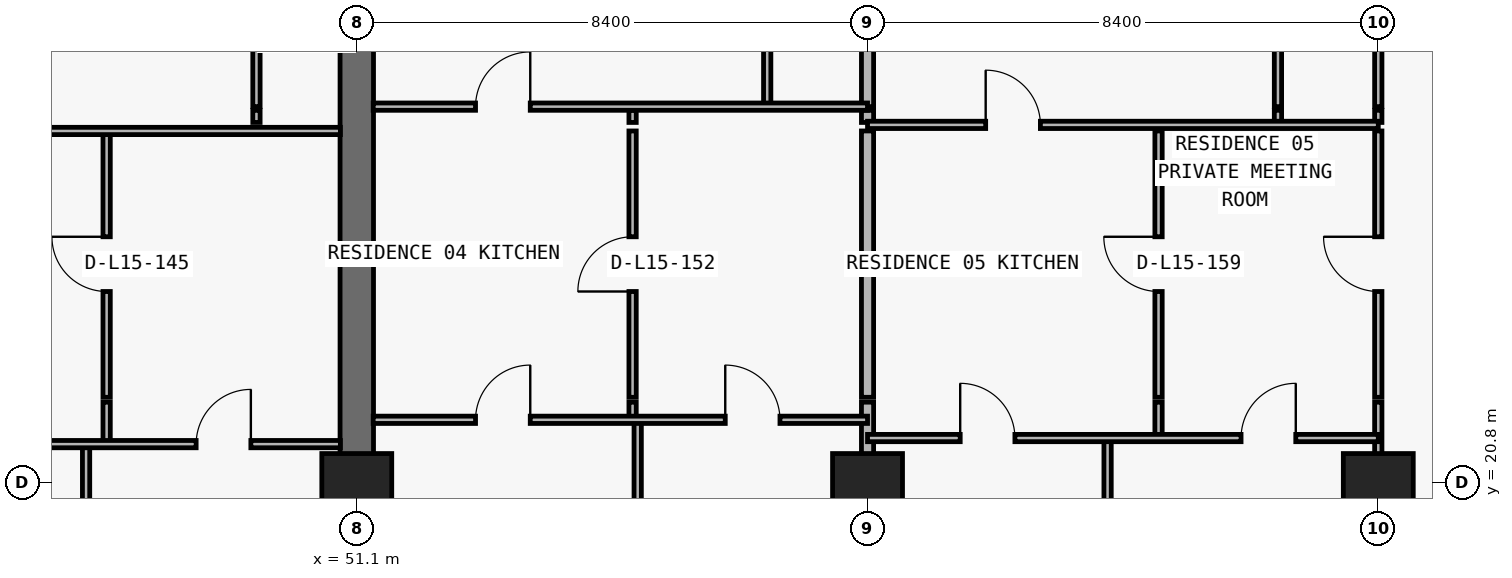
"""IFC4 building model, lengths in metres.
Left out: names, types, materials, properties, quantities, classifications, styles, units other than length and angle.
Written with IfcOpenShell. Run it as: python <this file> out.ifc"""

import sys

from ifc_helpers import new_model, si_unit, direction, frame, frame_2d, origin, origin_2d, place, context, subcontext, project, spatial, rectangle, extrude, element, fill, save


model = new_model("IFC4")
c1 = context("Model", 3, precision=1e-05, world=origin(), true_north=direction((0.0, 1.0)))
c2 = subcontext(c1, "Body", "Model", "MODEL_VIEW")
j1 = project(units=[si_unit("LENGTHUNIT", "METRE"), si_unit("PLANEANGLEUNIT", "RADIAN")], contexts=[c1])
p1 = place(None, origin())
s1 = spatial("IfcSite", under=j1, at=p1, CompositionType="ELEMENT")
p2 = place(p1, origin())
s2 = spatial("IfcBuilding", under=s1, at=p2, CompositionType="ELEMENT")
p3 = place(p2, frame((0.0, 0.0, 59.7)))
s3 = spatial("IfcBuildingStorey", under=s2, at=p3, CompositionType="ELEMENT", Elevation=59.7)
for number, where, z_axis, x_axis in (
    (1, (51.1, 20.8, 0.0), (0.0, 0.0, 1.0), (1.0, 0.0, 0.0)),
    (2, (59.5, 20.8, 0.0), (0.0, 0.0, 1.0), (1.0, 0.0, 0.0)),
    (3, (67.9, 20.8, 0.0), (0.0, 0.0, 1.0), (1.0, 0.0, 0.0)),
):
    element("IfcColumn", number, at=place(p3, frame(where, z_axis=z_axis, x_axis=x_axis)), inside=s3, PredefinedType="COLUMN", context=c2, shape_type="SweptSolid", body=[
        extrude(rectangle(XDim=1.15, YDim=0.95, at=origin_2d()), origin(), (0.0, 0.0, 1.0), 3.05),
    ])
p4 = place(p3, frame((51.1, 20.8, 0.0), z_axis=(0.0, 0.0, 1.0), x_axis=(0.0, 1.0, 0.0)))
e4 = element("IfcWall", 4, at=p4, inside=s3, PredefinedType="SHEAR", context=c2, shape_type="SweptSolid", body=[
    extrude(rectangle(XDim=8.6, YDim=0.55, at=frame_2d((4.3, 0.0))), origin(), (0.0, 0.0, 1.0), 3.05),
])
p5 = place(p3, frame((46.648, 6.24, 0.0), z_axis=(0.0, 0.0, 1.0), x_axis=(0.0, 1.0, 0.0)))
e5 = element("IfcWall", 5, at=p5, inside=s3, PredefinedType="PARTITIONING", context=c2, shape_type="SweptSolid", body=[
    extrude(rectangle(XDim=15.19, YDim=0.12, at=frame_2d((7.595, 0.0))), origin(), (0.0, 0.0, 1.0), 3.05),
])
p6 = place(p3, frame((46.986, 21.43, 0.0), z_axis=(0.0, 0.0, 1.0), x_axis=(0.0, 1.0, 0.0)))
e6 = element("IfcWall", 6, at=p6, inside=s3, PredefinedType="PARTITIONING", context=c2, shape_type="SweptSolid", body=[
    extrude(rectangle(XDim=0.69, YDim=0.12, at=frame_2d((0.345, 0.0))), origin(), (0.0, 0.0, 1.0), 3.05),
])
p7 = place(p3, frame((46.986, 22.2, 0.0), z_axis=(0.0, 0.0, 1.0), x_axis=(0.0, 1.0, 0.0)))
e7 = element("IfcWall", 7, at=p7, inside=s3, PredefinedType="PARTITIONING", context=c2, shape_type="SweptSolid", body=[
    extrude(rectangle(XDim=4.38, YDim=0.12, at=frame_2d((2.19, 0.0))), origin(), (0.0, 0.0, 1.0), 3.05),
])
p8 = place(p7, frame((1.74, 0.0, 0.0)))
e8 = element("IfcOpeningElement", 8, at=p8, cuts=e7, PredefinedType="OPENING", context=c2, shape_type="SweptSolid", body=[
    extrude(rectangle(XDim=0.9, YDim=2.15, at=frame_2d((0.45, 1.075))), frame((0.0, 0.07, 0.0), z_axis=(0.0, -1.0, 0.0), x_axis=(1.0, 0.0, 0.0)), (0.0, 0.0, 1.0), 0.14),
])
p9 = place(p3, frame((49.45, 26.72, 0.0), z_axis=(0.0, 0.0, 1.0), x_axis=(0.0, 1.0, 0.0)))
e9 = element("IfcWall", 9, at=p9, inside=s3, PredefinedType="PARTITIONING", context=c2, shape_type="SweptSolid", body=[
    extrude(rectangle(XDim=0.2, YDim=0.12, at=frame_2d((0.1, 0.0))), origin(), (0.0, 0.0, 1.0), 3.05),
])
p10 = place(p3, frame((49.45, 26.98, 0.0), z_axis=(0.0, 0.0, 1.0), x_axis=(0.0, 1.0, 0.0)))
e10 = element("IfcWall", 10, at=p10, inside=s3, PredefinedType="PARTITIONING", context=c2, shape_type="SweptSolid", body=[
    extrude(rectangle(XDim=6.82, YDim=0.12, at=frame_2d((3.41, 0.0))), origin(), (0.0, 0.0, 1.0), 3.05),
])
p11 = place(p10, frame((3.435, 0.0, 0.0)))
e11 = element("IfcOpeningElement", 11, at=p11, cuts=e10, PredefinedType="OPENING", context=c2, shape_type="SweptSolid", body=[
    extrude(rectangle(XDim=0.85, YDim=2.1, at=frame_2d((0.425, 1.05))), frame((0.0, 0.07, 0.0), z_axis=(0.0, -1.0, 0.0), x_axis=(1.0, 0.0, 0.0)), (0.0, 0.0, 1.0), 0.14),
])
p12 = place(p3, frame((51.1, 6.24, 0.0), z_axis=(0.0, 0.0, 1.0), x_axis=(0.0, 1.0, 0.0)))
e12 = element("IfcWall", 12, at=p12, inside=s3, PredefinedType="PARTITIONING", context=c2, shape_type="SweptSolid", body=[
    extrude(rectangle(XDim=14.555, YDim=0.2, at=frame_2d((7.277, 0.0))), origin(), (0.0, 0.0, 1.0), 2.11),
])
p13 = place(p3, frame((55.636, 21.83, 0.0), z_axis=(0.0, 0.0, 1.0), x_axis=(0.0, 1.0, 0.0)))
e13 = element("IfcWall", 13, at=p13, inside=s3, PredefinedType="PARTITIONING", context=c2, shape_type="SweptSolid", body=[
    extrude(rectangle(XDim=0.29, YDim=0.12, at=frame_2d((0.145, 0.0))), origin(), (0.0, 0.0, 1.0), 3.05),
])
p14 = place(p3, frame((55.636, 22.2, 0.0), z_axis=(0.0, 0.0, 1.0), x_axis=(0.0, 1.0, 0.0)))
e14 = element("IfcWall", 14, at=p14, inside=s3, PredefinedType="PARTITIONING", context=c2, shape_type="SweptSolid", body=[
    extrude(rectangle(XDim=4.38, YDim=0.12, at=frame_2d((2.19, 0.0))), origin(), (0.0, 0.0, 1.0), 3.05),
])
p15 = place(p14, frame((1.74, 0.0, 0.0)))
e15 = element("IfcOpeningElement", 15, at=p15, cuts=e14, PredefinedType="OPENING", context=c2, shape_type="SweptSolid", body=[
    extrude(rectangle(XDim=0.9, YDim=2.15, at=frame_2d((0.45, 1.075))), frame((0.0, 0.07, 0.0), z_axis=(0.0, -1.0, 0.0), x_axis=(1.0, 0.0, 0.0)), (0.0, 0.0, 1.0), 0.14),
])
p16 = place(p3, frame((55.636, 26.72, 0.0), z_axis=(0.0, 0.0, 1.0), x_axis=(0.0, 1.0, 0.0)))
e16 = element("IfcWall", 16, at=p16, inside=s3, PredefinedType="PARTITIONING", context=c2, shape_type="SweptSolid", body=[
    extrude(rectangle(XDim=0.2, YDim=0.12, at=frame_2d((0.1, 0.0))), origin(), (0.0, 0.0, 1.0), 3.05),
])
p17 = place(p3, frame((55.72, 6.24, 0.0), z_axis=(0.0, 0.0, 1.0), x_axis=(0.0, 1.0, 0.0)))
e17 = element("IfcWall", 17, at=p17, inside=s3, PredefinedType="PARTITIONING", context=c2, shape_type="SweptSolid", body=[
    extrude(rectangle(XDim=15.585, YDim=0.12, at=frame_2d((7.792, 0.0))), origin(), (0.0, 0.0, 1.0), 3.05),
])
p18 = place(p3, frame((57.85, 26.98, 0.0), z_axis=(0.0, 0.0, 1.0), x_axis=(0.0, 1.0, 0.0)))
e18 = element("IfcWall", 18, at=p18, inside=s3, PredefinedType="PARTITIONING", context=c2, shape_type="SweptSolid", body=[
    extrude(rectangle(XDim=6.82, YDim=0.12, at=frame_2d((3.41, 0.0))), origin(), (0.0, 0.0, 1.0), 3.05),
])
p19 = place(p18, frame((3.435, 0.0, 0.0)))
e19 = element("IfcOpeningElement", 19, at=p19, cuts=e18, PredefinedType="OPENING", context=c2, shape_type="SweptSolid", body=[
    extrude(rectangle(XDim=0.85, YDim=2.1, at=frame_2d((0.425, 1.05))), frame((0.0, 0.07, 0.0), z_axis=(0.0, -1.0, 0.0), x_axis=(1.0, 0.0, 0.0)), (0.0, 0.0, 1.0), 0.14),
])
p20 = place(p3, frame((59.5, 6.24, 0.0), z_axis=(0.0, 0.0, 1.0), x_axis=(0.0, 1.0, 0.0)))
e20 = element("IfcWall", 20, at=p20, inside=s3, PredefinedType="PARTITIONING", context=c2, shape_type="SweptSolid", body=[
    extrude(rectangle(XDim=15.88, YDim=0.2, at=frame_2d((7.94, 0.0))), origin(), (0.0, 0.0, 1.0), 2.11),
])
p21 = place(p3, frame((59.5, 22.2, 0.0), z_axis=(0.0, 0.0, 1.0), x_axis=(0.0, 1.0, 0.0)))
e21 = element("IfcWall", 21, at=p21, inside=s3, PredefinedType="PARTITIONING", context=c2, shape_type="SweptSolid", body=[
    extrude(rectangle(XDim=4.38, YDim=0.2, at=frame_2d((2.19, 0.0))), origin(), (0.0, 0.0, 1.0), 2.11),
])
p22 = place(p3, frame((59.5, 26.72, 0.0), z_axis=(0.0, 0.0, 1.0), x_axis=(0.0, 1.0, 0.0)))
e22 = element("IfcWall", 22, at=p22, inside=s3, PredefinedType="PARTITIONING", context=c2, shape_type="SweptSolid", body=[
    extrude(rectangle(XDim=0.2, YDim=0.2, at=frame_2d((0.1, 0.0))), origin(), (0.0, 0.0, 1.0), 2.11),
])
p23 = place(p3, frame((59.5, 26.98, 0.0), z_axis=(0.0, 0.0, 1.0), x_axis=(0.0, 1.0, 0.0)))
e23 = element("IfcWall", 23, at=p23, inside=s3, PredefinedType="PARTITIONING", context=c2, shape_type="SweptSolid", body=[
    extrude(rectangle(XDim=6.82, YDim=0.2, at=frame_2d((3.41, 0.0))), origin(), (0.0, 0.0, 1.0), 2.11),
])
p24 = place(p3, frame((63.448, 6.24, 0.0), z_axis=(0.0, 0.0, 1.0), x_axis=(0.0, 1.0, 0.0)))
e24 = element("IfcWall", 24, at=p24, inside=s3, PredefinedType="PARTITIONING", context=c2, shape_type="SweptSolid", body=[
    extrude(rectangle(XDim=15.29, YDim=0.12, at=frame_2d((7.645, 0.0))), origin(), (0.0, 0.0, 1.0), 3.05),
])
p25 = place(p3, frame((64.286, 21.53, 0.0), z_axis=(0.0, 0.0, 1.0), x_axis=(0.0, 1.0, 0.0)))
e25 = element("IfcWall", 25, at=p25, inside=s3, PredefinedType="PARTITIONING", context=c2, shape_type="SweptSolid", body=[
    extrude(rectangle(XDim=0.59, YDim=0.12, at=frame_2d((0.295, 0.0))), origin(), (0.0, 0.0, 1.0), 3.05),
])
p26 = place(p3, frame((64.286, 22.2, 0.0), z_axis=(0.0, 0.0, 1.0), x_axis=(0.0, 1.0, 0.0)))
e26 = element("IfcWall", 26, at=p26, inside=s3, PredefinedType="PARTITIONING", context=c2, shape_type="SweptSolid", body=[
    extrude(rectangle(XDim=4.38, YDim=0.12, at=frame_2d((2.19, 0.0))), origin(), (0.0, 0.0, 1.0), 3.05),
])
p27 = place(p26, frame((1.74, 0.0, 0.0)))
e27 = element("IfcOpeningElement", 27, at=p27, cuts=e26, PredefinedType="OPENING", context=c2, shape_type="SweptSolid", body=[
    extrude(rectangle(XDim=0.9, YDim=2.15, at=frame_2d((0.45, 1.075))), frame((0.0, 0.07, 0.0), z_axis=(0.0, -1.0, 0.0), x_axis=(1.0, 0.0, 0.0)), (0.0, 0.0, 1.0), 0.14),
])
p28 = place(p3, frame((66.25, 26.72, 0.0), z_axis=(0.0, 0.0, 1.0), x_axis=(0.0, 1.0, 0.0)))
e28 = element("IfcWall", 28, at=p28, inside=s3, PredefinedType="PARTITIONING", context=c2, shape_type="SweptSolid", body=[
    extrude(rectangle(XDim=0.2, YDim=0.12, at=frame_2d((0.1, 0.0))), origin(), (0.0, 0.0, 1.0), 3.05),
])
p29 = place(p3, frame((66.25, 26.98, 0.0), z_axis=(0.0, 0.0, 1.0), x_axis=(0.0, 1.0, 0.0)))
e29 = element("IfcWall", 29, at=p29, inside=s3, PredefinedType="PARTITIONING", context=c2, shape_type="SweptSolid", body=[
    extrude(rectangle(XDim=6.82, YDim=0.12, at=frame_2d((3.41, 0.0))), origin(), (0.0, 0.0, 1.0), 3.05),
])
p30 = place(p29, frame((3.435, 0.0, 0.0)))
e30 = element("IfcOpeningElement", 30, at=p30, cuts=e29, PredefinedType="OPENING", context=c2, shape_type="SweptSolid", body=[
    extrude(rectangle(XDim=0.85, YDim=2.1, at=frame_2d((0.425, 1.05))), frame((0.0, 0.07, 0.0), z_axis=(0.0, -1.0, 0.0), x_axis=(1.0, 0.0, 0.0)), (0.0, 0.0, 1.0), 0.14),
])
p31 = place(p3, frame((67.9, 6.24, 0.0), z_axis=(0.0, 0.0, 1.0), x_axis=(0.0, 1.0, 0.0)))
e31 = element("IfcWall", 31, at=p31, inside=s3, PredefinedType="PARTITIONING", context=c2, shape_type="SweptSolid", body=[
    extrude(rectangle(XDim=15.88, YDim=0.12, at=frame_2d((7.94, 0.0))), origin(), (0.0, 0.0, 1.0), 2.11),
])
p32 = place(p3, frame((67.9, 22.2, 0.0), z_axis=(0.0, 0.0, 1.0), x_axis=(0.0, 1.0, 0.0)))
e32 = element("IfcWall", 32, at=p32, inside=s3, PredefinedType="PARTITIONING", context=c2, shape_type="SweptSolid", body=[
    extrude(rectangle(XDim=4.38, YDim=0.12, at=frame_2d((2.19, 0.0))), origin(), (0.0, 0.0, 1.0), 2.11),
])
p33 = place(p32, frame((1.74, 0.0, 0.0)))
e33 = element("IfcOpeningElement", 33, at=p33, cuts=e32, PredefinedType="OPENING", context=c2, shape_type="SweptSolid", body=[
    extrude(rectangle(XDim=0.9, YDim=2.06, at=frame_2d((0.45, 1.03))), frame((0.0, 0.07, 0.0), z_axis=(0.0, -1.0, 0.0), x_axis=(1.0, 0.0, 0.0)), (0.0, 0.0, 1.0), 0.14),
])
p34 = place(p3, frame((67.9, 26.72, 0.0), z_axis=(0.0, 0.0, 1.0), x_axis=(0.0, 1.0, 0.0)))
e34 = element("IfcWall", 34, at=p34, inside=s3, PredefinedType="PARTITIONING", context=c2, shape_type="SweptSolid", body=[
    extrude(rectangle(XDim=0.2, YDim=0.12, at=frame_2d((0.1, 0.0))), origin(), (0.0, 0.0, 1.0), 2.11),
])
p35 = place(p3, frame((67.9, 26.98, 0.0), z_axis=(0.0, 0.0, 1.0), x_axis=(0.0, 1.0, 0.0)))
e35 = element("IfcWall", 35, at=p35, inside=s3, PredefinedType="PARTITIONING", context=c2, shape_type="SweptSolid", body=[
    extrude(rectangle(XDim=6.82, YDim=0.12, at=frame_2d((3.41, 0.0))), origin(), (0.0, 0.0, 1.0), 2.11),
])
p36 = place(p3, frame((42.7, 21.43, 0.0), z_axis=(0.0, 0.0, 1.0), x_axis=(1.0, 0.0, 0.0)))
e36 = element("IfcWall", 36, at=p36, inside=s3, PredefinedType="PARTITIONING", context=c2, shape_type="SweptSolid", body=[
    extrude(rectangle(XDim=8.13, YDim=0.12, at=frame_2d((4.065, 0.0))), origin(), (0.0, 0.0, 1.0), 3.05),
])
p37 = place(p36, frame((1.524, 0.0, 0.0)))
e37 = element("IfcOpeningElement", 37, at=p37, cuts=e36, PredefinedType="OPENING", context=c2, shape_type="SweptSolid", body=[
    extrude(rectangle(XDim=0.9, YDim=2.15, at=frame_2d((0.45, 1.075))), frame((0.0, 0.07, 0.0), z_axis=(0.0, -1.0, 0.0), x_axis=(1.0, 0.0, 0.0)), (0.0, 0.0, 1.0), 0.14),
])
p38 = place(p36, frame((5.758, 0.0, 0.0)))
e38 = element("IfcOpeningElement", 38, at=p38, cuts=e36, PredefinedType="OPENING", context=c2, shape_type="SweptSolid", body=[
    extrude(rectangle(XDim=0.9, YDim=2.15, at=frame_2d((0.45, 1.075))), frame((0.0, 0.07, 0.0), z_axis=(0.0, -1.0, 0.0), x_axis=(1.0, 0.0, 0.0)), (0.0, 0.0, 1.0), 0.14),
])
p39 = place(p3, frame((59.5, 21.53, 0.0), z_axis=(0.0, 0.0, 1.0), x_axis=(1.0, 0.0, 0.0)))
e39 = element("IfcWall", 39, at=p39, inside=s3, PredefinedType="PARTITIONING", context=c2, shape_type="SweptSolid", body=[
    extrude(rectangle(XDim=8.4, YDim=0.12, at=frame_2d((4.2, 0.0))), origin(), (0.0, 0.0, 1.0), 3.05),
])
p40 = place(p39, frame((1.524, 0.0, 0.0)))
e40 = element("IfcOpeningElement", 40, at=p40, cuts=e39, PredefinedType="OPENING", context=c2, shape_type="SweptSolid", body=[
    extrude(rectangle(XDim=0.9, YDim=2.15, at=frame_2d((0.45, 1.075))), frame((0.0, 0.07, 0.0), z_axis=(0.0, -1.0, 0.0), x_axis=(1.0, 0.0, 0.0)), (0.0, 0.0, 1.0), 0.14),
])
p41 = place(p39, frame((6.143, 0.0, 0.0)))
e41 = element("IfcOpeningElement", 41, at=p41, cuts=e39, PredefinedType="OPENING", context=c2, shape_type="SweptSolid", body=[
    extrude(rectangle(XDim=0.9, YDim=2.15, at=frame_2d((0.45, 1.075))), frame((0.0, 0.07, 0.0), z_axis=(0.0, -1.0, 0.0), x_axis=(1.0, 0.0, 0.0)), (0.0, 0.0, 1.0), 0.14),
])
p42 = place(p3, frame((51.37, 21.83, 0.0), z_axis=(0.0, 0.0, 1.0), x_axis=(1.0, 0.0, 0.0)))
e42 = element("IfcWall", 42, at=p42, inside=s3, PredefinedType="PARTITIONING", context=c2, shape_type="SweptSolid", body=[
    extrude(rectangle(XDim=8.13, YDim=0.12, at=frame_2d((4.065, 0.0))), origin(), (0.0, 0.0, 1.0), 3.05),
])
p43 = place(p42, frame((1.683, 0.0, 0.0)))
e43 = element("IfcOpeningElement", 43, at=p43, cuts=e42, PredefinedType="OPENING", context=c2, shape_type="SweptSolid", body=[
    extrude(rectangle(XDim=0.9, YDim=2.15, at=frame_2d((0.45, 1.075))), frame((0.0, 0.07, 0.0), z_axis=(0.0, -1.0, 0.0), x_axis=(1.0, 0.0, 0.0)), (0.0, 0.0, 1.0), 0.14),
])
p44 = place(p42, frame((5.79, 0.0, 0.0)))
e44 = element("IfcOpeningElement", 44, at=p44, cuts=e42, PredefinedType="OPENING", context=c2, shape_type="SweptSolid", body=[
    extrude(rectangle(XDim=0.9, YDim=2.15, at=frame_2d((0.45, 1.075))), frame((0.0, 0.07, 0.0), z_axis=(0.0, -1.0, 0.0), x_axis=(1.0, 0.0, 0.0)), (0.0, 0.0, 1.0), 0.14),
])
p45 = place(p3, frame((42.7, 26.58, 0.0), z_axis=(0.0, 0.0, 1.0), x_axis=(1.0, 0.0, 0.0)))
e45 = element("IfcWall", 45, at=p45, inside=s3, PredefinedType="PARTITIONING", context=c2, shape_type="SweptSolid", body=[
    extrude(rectangle(XDim=8.13, YDim=0.12, at=frame_2d((4.065, 0.0))), origin(), (0.0, 0.0, 1.0), 3.05),
])
p46 = place(p45, frame((1.693, 0.0, 0.0)))
e46 = element("IfcOpeningElement", 46, at=p46, cuts=e45, PredefinedType="OPENING", context=c2, shape_type="SweptSolid", body=[
    extrude(rectangle(XDim=0.9, YDim=2.15, at=frame_2d((0.45, 1.075))), frame((0.0, 0.07, 0.0), z_axis=(0.0, -1.0, 0.0), x_axis=(1.0, 0.0, 0.0)), (0.0, 0.0, 1.0), 0.14),
])
p47 = place(p3, frame((59.5, 26.68, 0.0), z_axis=(0.0, 0.0, 1.0), x_axis=(1.0, 0.0, 0.0)))
e47 = element("IfcWall", 47, at=p47, inside=s3, PredefinedType="PARTITIONING", context=c2, shape_type="SweptSolid", body=[
    extrude(rectangle(XDim=8.4, YDim=0.12, at=frame_2d((4.2, 0.0))), origin(), (0.0, 0.0, 1.0), 3.05),
])
p48 = place(p47, frame((1.943, 0.0, 0.0)))
e48 = element("IfcOpeningElement", 48, at=p48, cuts=e47, PredefinedType="OPENING", context=c2, shape_type="SweptSolid", body=[
    extrude(rectangle(XDim=0.9, YDim=2.15, at=frame_2d((0.45, 1.075))), frame((0.0, 0.07, 0.0), z_axis=(0.0, -1.0, 0.0), x_axis=(1.0, 0.0, 0.0)), (0.0, 0.0, 1.0), 0.14),
])
p49 = place(p3, frame((51.37, 26.98, 0.0), z_axis=(0.0, 0.0, 1.0), x_axis=(1.0, 0.0, 0.0)))
e49 = element("IfcWall", 49, at=p49, inside=s3, PredefinedType="PARTITIONING", context=c2, shape_type="SweptSolid", body=[
    extrude(rectangle(XDim=8.13, YDim=0.12, at=frame_2d((4.065, 0.0))), origin(), (0.0, 0.0, 1.0), 3.05),
])
p50 = place(p49, frame((1.683, 0.0, 0.0)))
e50 = element("IfcOpeningElement", 50, at=p50, cuts=e49, PredefinedType="OPENING", context=c2, shape_type="SweptSolid", body=[
    extrude(rectangle(XDim=0.9, YDim=2.15, at=frame_2d((0.45, 1.075))), frame((0.0, 0.07, 0.0), z_axis=(0.0, -1.0, 0.0), x_axis=(1.0, 0.0, 0.0)), (0.0, 0.0, 1.0), 0.14),
])
p51 = place(p8, origin())
e51 = element("IfcDoor", 51, at=p51, inside=s3, OperationType="SINGLE_SWING_RIGHT", PredefinedType="DOOR", context=c2, shape_type="SweptSolid", body=[
    extrude(rectangle(XDim=0.9, YDim=2.15, at=frame_2d((0.45, 1.075))), frame((0.0, 0.025, 0.0), z_axis=(0.0, -1.0, 0.0), x_axis=(1.0, 0.0, 0.0)), (0.0, 0.0, 1.0), 0.05),
])
fill(e8, e51)
p52 = place(p38, origin())
e52 = element("IfcDoor", 52, at=p52, inside=s3, OperationType="SINGLE_SWING_RIGHT", PredefinedType="DOOR", context=c2, shape_type="SweptSolid", body=[
    extrude(rectangle(XDim=0.9, YDim=2.15, at=frame_2d((0.45, 1.075))), frame((0.0, 0.025, 0.0), z_axis=(0.0, -1.0, 0.0), x_axis=(1.0, 0.0, 0.0)), (0.0, 0.0, 1.0), 0.05),
])
fill(e38, e52)
p53 = place(p50, origin())
e53 = element("IfcDoor", 53, at=p53, inside=s3, OperationType="SINGLE_SWING_RIGHT", PredefinedType="DOOR", context=c2, shape_type="SweptSolid", body=[
    extrude(rectangle(XDim=0.9, YDim=2.15, at=frame_2d((0.45, 1.075))), frame((0.0, 0.025, 0.0), z_axis=(0.0, -1.0, 0.0), x_axis=(1.0, 0.0, 0.0)), (0.0, 0.0, 1.0), 0.05),
])
fill(e50, e53)
p54 = place(p15, origin())
e54 = element("IfcDoor", 54, at=p54, inside=s3, OperationType="SINGLE_SWING_LEFT", PredefinedType="DOOR", context=c2, shape_type="SweptSolid", body=[
    extrude(rectangle(XDim=0.9, YDim=2.15, at=frame_2d((0.45, 1.075))), frame((0.0, 0.025, 0.0), z_axis=(0.0, -1.0, 0.0), x_axis=(1.0, 0.0, 0.0)), (0.0, 0.0, 1.0), 0.05),
])
fill(e15, e54)
p55 = place(p43, origin())
e55 = element("IfcDoor", 55, at=p55, inside=s3, OperationType="SINGLE_SWING_RIGHT", PredefinedType="DOOR", context=c2, shape_type="SweptSolid", body=[
    extrude(rectangle(XDim=0.9, YDim=2.15, at=frame_2d((0.45, 1.075))), frame((0.0, 0.025, 0.0), z_axis=(0.0, -1.0, 0.0), x_axis=(1.0, 0.0, 0.0)), (0.0, 0.0, 1.0), 0.05),
])
fill(e43, e55)
p56 = place(p44, origin())
e56 = element("IfcDoor", 56, at=p56, inside=s3, OperationType="SINGLE_SWING_LEFT", PredefinedType="DOOR", context=c2, shape_type="SweptSolid", body=[
    extrude(rectangle(XDim=0.9, YDim=2.15, at=frame_2d((0.45, 1.075))), frame((0.0, 0.025, 0.0), z_axis=(0.0, -1.0, 0.0), x_axis=(1.0, 0.0, 0.0)), (0.0, 0.0, 1.0), 0.05),
])
fill(e44, e56)
p57 = place(p48, origin())
e57 = element("IfcDoor", 57, at=p57, inside=s3, OperationType="SINGLE_SWING_LEFT", PredefinedType="DOOR", context=c2, shape_type="SweptSolid", body=[
    extrude(rectangle(XDim=0.9, YDim=2.15, at=frame_2d((0.45, 1.075))), frame((0.0, 0.025, 0.0), z_axis=(0.0, -1.0, 0.0), x_axis=(1.0, 0.0, 0.0)), (0.0, 0.0, 1.0), 0.05),
])
fill(e48, e57)
p58 = place(p27, origin())
e58 = element("IfcDoor", 58, at=p58, inside=s3, OperationType="SINGLE_SWING_RIGHT", PredefinedType="DOOR", context=c2, shape_type="SweptSolid", body=[
    extrude(rectangle(XDim=0.9, YDim=2.15, at=frame_2d((0.45, 1.075))), frame((0.0, 0.025, 0.0), z_axis=(0.0, -1.0, 0.0), x_axis=(1.0, 0.0, 0.0)), (0.0, 0.0, 1.0), 0.05),
])
fill(e27, e58)
p59 = place(p40, origin())
e59 = element("IfcDoor", 59, at=p59, inside=s3, OperationType="SINGLE_SWING_LEFT", PredefinedType="DOOR", context=c2, shape_type="SweptSolid", body=[
    extrude(rectangle(XDim=0.9, YDim=2.15, at=frame_2d((0.45, 1.075))), frame((0.0, 0.025, 0.0), z_axis=(0.0, -1.0, 0.0), x_axis=(1.0, 0.0, 0.0)), (0.0, 0.0, 1.0), 0.05),
])
fill(e40, e59)
p60 = place(p41, origin())
e60 = element("IfcDoor", 60, at=p60, inside=s3, OperationType="SINGLE_SWING_RIGHT", PredefinedType="DOOR", context=c2, shape_type="SweptSolid", body=[
    extrude(rectangle(XDim=0.9, YDim=2.15, at=frame_2d((0.45, 1.075))), frame((0.0, 0.025, 0.0), z_axis=(0.0, -1.0, 0.0), x_axis=(1.0, 0.0, 0.0)), (0.0, 0.0, 1.0), 0.05),
])
fill(e41, e60)
p61 = place(p33, origin())
e61 = element("IfcDoor", 61, at=p61, inside=s3, OperationType="SINGLE_SWING_RIGHT", PredefinedType="DOOR", context=c2, shape_type="SweptSolid", body=[
    extrude(rectangle(XDim=0.9, YDim=2.06, at=frame_2d((0.45, 1.03))), frame((0.0, 0.025, 0.0), z_axis=(0.0, -1.0, 0.0), x_axis=(1.0, 0.0, 0.0)), (0.0, 0.0, 1.0), 0.05),
])
fill(e33, e61)
save(model, sys.argv[1])
